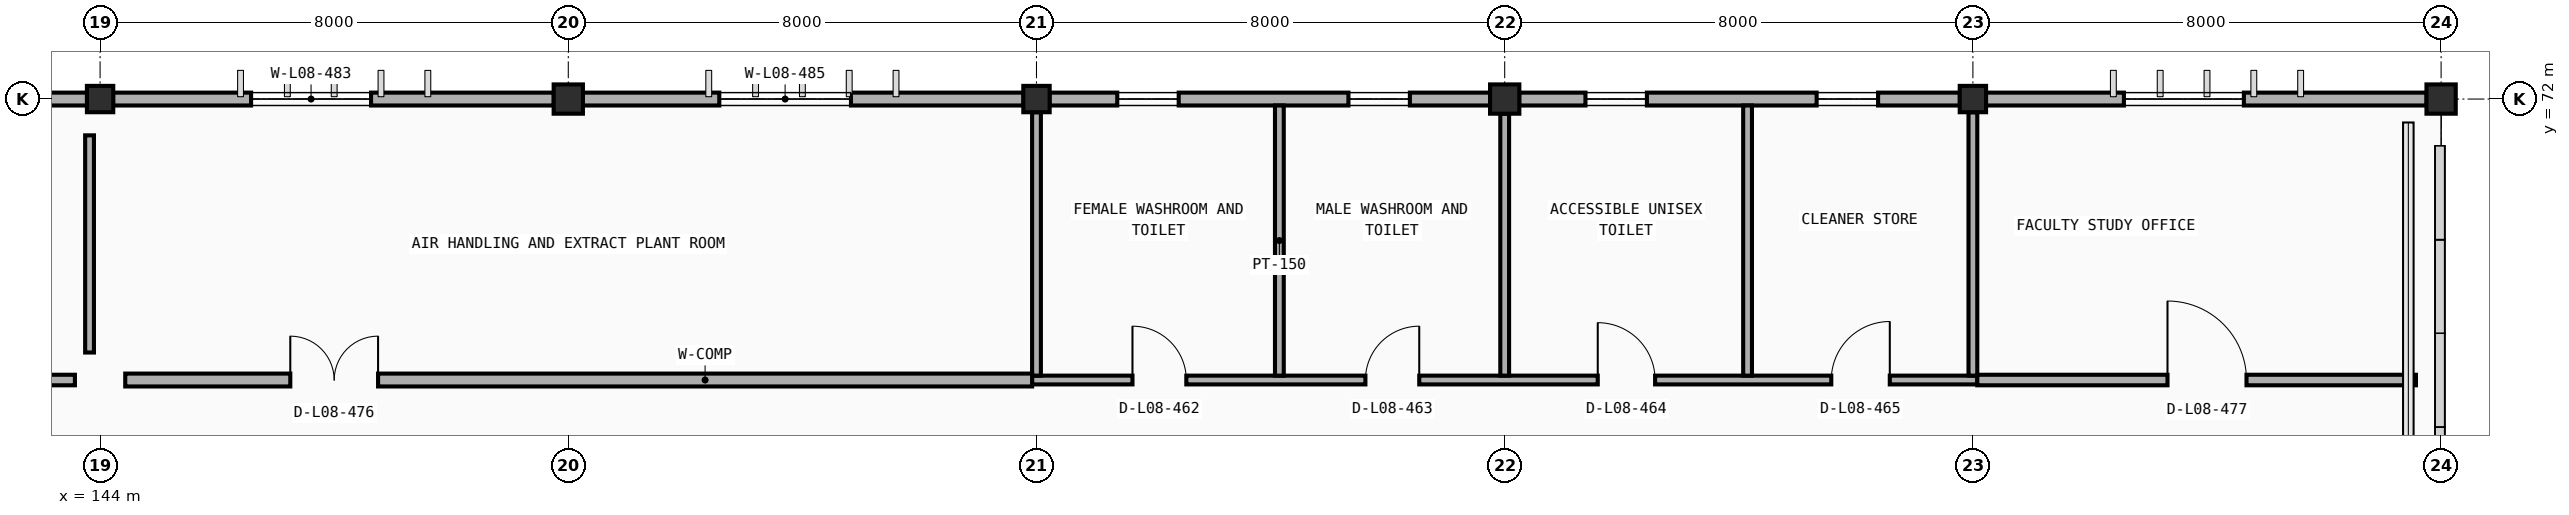
"""IFC4 building model, lengths in metres.
Left out: names, types, materials, properties, quantities, classifications, styles, units other than length and angle.
Written with IfcOpenShell. Run it as: python <this file> out.ifc"""

import sys

from ifc_helpers import new_model, si_unit, direction, frame, frame_2d, origin, origin_2d, place, context, subcontext, project, spatial, rectangle, extrude, element, fill, save


model = new_model("IFC4")
c1 = context("Model", 3, precision=1e-05, world=origin(), true_north=direction((0.0, 1.0)))
c2 = subcontext(c1, "Body", "Model", "MODEL_VIEW")
j1 = project(units=[si_unit("LENGTHUNIT", "METRE"), si_unit("PLANEANGLEUNIT", "RADIAN")], contexts=[c1])
p1 = place(None, origin())
s1 = spatial("IfcSite", under=j1, at=p1, CompositionType="ELEMENT")
p2 = place(p1, origin())
s2 = spatial("IfcBuilding", under=s1, at=p2, CompositionType="ELEMENT")
p3 = place(p2, frame((0.0, 0.0, 30.6)))
s3 = spatial("IfcBuildingStorey", under=s2, at=p3, CompositionType="ELEMENT", Elevation=30.6)
p4 = place(p3, frame((144.0, 72.0, 0.0), z_axis=(0.0, 0.0, 1.0), x_axis=(1.0, 0.0, 0.0)))
e1 = element("IfcColumn", 1, at=p4, inside=s3, PredefinedType="COLUMN", context=c2, shape_type="SweptSolid", body=[
    extrude(rectangle(XDim=0.45, YDim=0.45, at=origin_2d()), origin(), (0.0, 0.0, 1.0), 4.2),
])
p5 = place(p3, frame((152.0, 72.0, 0.0), z_axis=(0.0, 0.0, 1.0), x_axis=(1.0, 0.0, 0.0)))
e2 = element("IfcColumn", 2, at=p5, inside=s3, PredefinedType="COLUMN", context=c2, shape_type="SweptSolid", body=[
    extrude(rectangle(XDim=0.5, YDim=0.5, at=origin_2d()), origin(), (0.0, 0.0, 1.0), 4.2),
])
p6 = place(p3, frame((160.0, 72.0, 0.0), z_axis=(0.0, 0.0, 1.0), x_axis=(1.0, 0.0, 0.0)))
e3 = element("IfcColumn", 3, at=p6, inside=s3, PredefinedType="COLUMN", context=c2, shape_type="SweptSolid", body=[
    extrude(rectangle(XDim=0.45, YDim=0.45, at=origin_2d()), origin(), (0.0, 0.0, 1.0), 4.2),
])
p7 = place(p3, frame((168.0, 72.0, 0.0), z_axis=(0.0, 0.0, 1.0), x_axis=(1.0, 0.0, 0.0)))
e4 = element("IfcColumn", 4, at=p7, inside=s3, PredefinedType="COLUMN", context=c2, shape_type="SweptSolid", body=[
    extrude(rectangle(XDim=0.5, YDim=0.5, at=origin_2d()), origin(), (0.0, 0.0, 1.0), 4.2),
])
p8 = place(p3, frame((176.0, 72.0, 0.0), z_axis=(0.0, 0.0, 1.0), x_axis=(1.0, 0.0, 0.0)))
e5 = element("IfcColumn", 5, at=p8, inside=s3, PredefinedType="COLUMN", context=c2, shape_type="SweptSolid", body=[
    extrude(rectangle(XDim=0.45, YDim=0.45, at=origin_2d()), origin(), (0.0, 0.0, 1.0), 4.2),
])
p9 = place(p3, frame((184.0, 72.0, 0.0), z_axis=(0.0, 0.0, 1.0), x_axis=(1.0, 0.0, 0.0)))
e6 = element("IfcColumn", 6, at=p9, inside=s3, PredefinedType="COLUMN", context=c2, shape_type="SweptSolid", body=[
    extrude(rectangle(XDim=0.5, YDim=0.5, at=origin_2d()), origin(), (0.0, 0.0, 1.0), 4.2),
])
p10 = place(p3, frame((136.247, 72.0, 0.0), z_axis=(0.0, 0.0, 1.0), x_axis=(1.0, 0.0, 0.0)))
e7 = element("IfcWall", 7, at=p10, inside=s3, PredefinedType="STANDARD", context=c2, shape_type="SweptSolid", body=[
    extrude(rectangle(XDim=7.531, YDim=0.22, at=frame_2d((3.766, 0.0))), origin(), (0.0, 0.0, 1.0), 3.335),
])
p11 = place(p10, frame((2.333, 0.0, 0.9)))
e8 = element("IfcOpeningElement", 8, at=p11, cuts=e7, PredefinedType="OPENING", context=c2, shape_type="SweptSolid", body=[
    extrude(rectangle(XDim=1.85, YDim=1.25, at=frame_2d((0.925, 0.625))), frame((0.0, 0.12, 0.0), z_axis=(0.0, -1.0, 0.0), x_axis=(1.0, 0.0, 0.0)), (0.0, 0.0, 1.0), 0.24),
])
p12 = place(p3, frame((144.222, 72.0, 0.0), z_axis=(0.0, 0.0, 1.0), x_axis=(1.0, 0.0, 0.0)))
e9 = element("IfcWall", 9, at=p12, inside=s3, PredefinedType="STANDARD", context=c2, shape_type="SweptSolid", body=[
    extrude(rectangle(XDim=7.531, YDim=0.22, at=frame_2d((3.766, 0.0))), origin(), (0.0, 0.0, 1.0), 3.335),
])
p13 = place(p12, frame((2.358, 0.0, 0.9)))
e10 = element("IfcOpeningElement", 10, at=p13, cuts=e9, PredefinedType="OPENING", context=c2, shape_type="SweptSolid", body=[
    extrude(rectangle(XDim=2.05, YDim=1.25, at=frame_2d((1.025, 0.625))), frame((0.0, 0.12, 0.0), z_axis=(0.0, -1.0, 0.0), x_axis=(1.0, 0.0, 0.0)), (0.0, 0.0, 1.0), 0.24),
])
p14 = place(p3, frame((152.247, 72.0, 0.0), z_axis=(0.0, 0.0, 1.0), x_axis=(1.0, 0.0, 0.0)))
e11 = element("IfcWall", 11, at=p14, inside=s3, PredefinedType="STANDARD", context=c2, shape_type="SweptSolid", body=[
    extrude(rectangle(XDim=7.531, YDim=0.22, at=frame_2d((3.766, 0.0))), origin(), (0.0, 0.0, 1.0), 3.335),
])
p15 = place(p14, frame((2.333, 0.0, 0.9)))
e12 = element("IfcOpeningElement", 12, at=p15, cuts=e11, PredefinedType="OPENING", context=c2, shape_type="SweptSolid", body=[
    extrude(rectangle(XDim=2.25, YDim=1.25, at=frame_2d((1.125, 0.625))), frame((0.0, 0.12, 0.0), z_axis=(0.0, -1.0, 0.0), x_axis=(1.0, 0.0, 0.0)), (0.0, 0.0, 1.0), 0.24),
])
p16 = place(p3, frame((160.222, 72.0, 0.0), z_axis=(0.0, 0.0, 1.0), x_axis=(1.0, 0.0, 0.0)))
e13 = element("IfcWall", 13, at=p16, inside=s3, PredefinedType="STANDARD", context=c2, shape_type="SweptSolid", body=[
    extrude(rectangle(XDim=7.531, YDim=0.22, at=frame_2d((3.766, 0.0))), origin(), (0.0, 0.0, 1.0), 3.335),
])
p17 = place(p16, frame((1.158, 0.0, 1.15)))
e14 = element("IfcOpeningElement", 14, at=p17, cuts=e13, PredefinedType="OPENING", context=c2, shape_type="SweptSolid", body=[
    extrude(rectangle(XDim=1.05, YDim=1.25, at=frame_2d((0.525, 0.625))), frame((0.0, 0.12, 0.0), z_axis=(0.0, -1.0, 0.0), x_axis=(1.0, 0.0, 0.0)), (0.0, 0.0, 1.0), 0.24),
])
p18 = place(p16, frame((5.108, 0.0, 1.15)))
e15 = element("IfcOpeningElement", 15, at=p18, cuts=e13, PredefinedType="OPENING", context=c2, shape_type="SweptSolid", body=[
    extrude(rectangle(XDim=1.05, YDim=1.25, at=frame_2d((0.525, 0.625))), frame((0.0, 0.12, 0.0), z_axis=(0.0, -1.0, 0.0), x_axis=(1.0, 0.0, 0.0)), (0.0, 0.0, 1.0), 0.24),
])
p19 = place(p3, frame((168.247, 72.0, 0.0), z_axis=(0.0, 0.0, 1.0), x_axis=(1.0, 0.0, 0.0)))
e16 = element("IfcWall", 16, at=p19, inside=s3, PredefinedType="STANDARD", context=c2, shape_type="SweptSolid", body=[
    extrude(rectangle(XDim=7.531, YDim=0.22, at=frame_2d((3.766, 0.0))), origin(), (0.0, 0.0, 1.0), 3.335),
])
p20 = place(p19, frame((1.133, 0.0, 1.15)))
e17 = element("IfcOpeningElement", 17, at=p20, cuts=e16, PredefinedType="OPENING", context=c2, shape_type="SweptSolid", body=[
    extrude(rectangle(XDim=1.05, YDim=1.25, at=frame_2d((0.525, 0.625))), frame((0.0, 0.12, 0.0), z_axis=(0.0, -1.0, 0.0), x_axis=(1.0, 0.0, 0.0)), (0.0, 0.0, 1.0), 0.24),
])
p21 = place(p19, frame((5.083, 0.0, 1.15)))
e18 = element("IfcOpeningElement", 18, at=p21, cuts=e16, PredefinedType="OPENING", context=c2, shape_type="SweptSolid", body=[
    extrude(rectangle(XDim=1.05, YDim=1.25, at=frame_2d((0.525, 0.625))), frame((0.0, 0.12, 0.0), z_axis=(0.0, -1.0, 0.0), x_axis=(1.0, 0.0, 0.0)), (0.0, 0.0, 1.0), 0.24),
])
p22 = place(p3, frame((176.222, 72.0, 0.0), z_axis=(0.0, 0.0, 1.0), x_axis=(1.0, 0.0, 0.0)))
e19 = element("IfcWall", 19, at=p22, inside=s3, PredefinedType="STANDARD", context=c2, shape_type="SweptSolid", body=[
    extrude(rectangle(XDim=7.531, YDim=0.22, at=frame_2d((3.766, 0.0))), origin(), (0.0, 0.0, 1.0), 3.335),
])
p23 = place(p22, frame((2.358, 0.0, 0.9)))
e20 = element("IfcOpeningElement", 20, at=p23, cuts=e19, PredefinedType="OPENING", context=c2, shape_type="SweptSolid", body=[
    extrude(rectangle(XDim=2.05, YDim=1.25, at=frame_2d((1.025, 0.625))), frame((0.0, 0.12, 0.0), z_axis=(0.0, -1.0, 0.0), x_axis=(1.0, 0.0, 0.0)), (0.0, 0.0, 1.0), 0.24),
])
p24 = place(p3, frame((183.76, 71.78, 0.0), z_axis=(0.0, 0.0, 1.0), x_axis=(-1.0, 0.0, 0.0)))
e21 = element("IfcWall", 21, at=p24, inside=s3, PredefinedType="PARAPET", context=c2, shape_type="SweptSolid", body=[
    extrude(rectangle(XDim=0.32, YDim=0.2, at=frame_2d((0.16, 0.0))), origin(), (0.0, 0.0, 1.0), 3.35),
])
p25 = place(p3, frame((159.925, 67.2, 0.0), z_axis=(0.0, 0.0, 1.0), x_axis=(1.0, 0.0, 0.0)))
e22 = element("IfcWall", 22, at=p25, inside=s3, PredefinedType="PARTITIONING", context=c2, shape_type="SweptSolid", body=[
    extrude(rectangle(XDim=16.15, YDim=0.15, at=frame_2d((8.075, 0.0))), origin(), (0.0, 0.0, 1.0), 3.3),
])
p26 = place(p25, frame((1.715, 0.0, 0.0)))
e23 = element("IfcOpeningElement", 23, at=p26, cuts=e22, PredefinedType="OPENING", context=c2, shape_type="SweptSolid", body=[
    extrude(rectangle(XDim=0.92, YDim=2.12, at=frame_2d((0.46, 1.06))), frame((0.0, 0.085, 0.0), z_axis=(0.0, -1.0, 0.0), x_axis=(1.0, 0.0, 0.0)), (0.0, 0.0, 1.0), 0.17),
])
p27 = place(p25, frame((5.695, 0.0, 0.0)))
e24 = element("IfcOpeningElement", 24, at=p27, cuts=e22, PredefinedType="OPENING", context=c2, shape_type="SweptSolid", body=[
    extrude(rectangle(XDim=0.92, YDim=2.12, at=frame_2d((0.46, 1.06))), frame((0.0, 0.085, 0.0), z_axis=(0.0, -1.0, 0.0), x_axis=(1.0, 0.0, 0.0)), (0.0, 0.0, 1.0), 0.17),
])
p28 = place(p25, frame((9.665, 0.0, 0.0)))
e25 = element("IfcOpeningElement", 25, at=p28, cuts=e22, PredefinedType="OPENING", context=c2, shape_type="SweptSolid", body=[
    extrude(rectangle(XDim=0.98, YDim=2.12, at=frame_2d((0.49, 1.06))), frame((0.0, 0.085, 0.0), z_axis=(0.0, -1.0, 0.0), x_axis=(1.0, 0.0, 0.0)), (0.0, 0.0, 1.0), 0.17),
])
p29 = place(p25, frame((13.655, 0.0, 0.0)))
e26 = element("IfcOpeningElement", 26, at=p29, cuts=e22, PredefinedType="OPENING", context=c2, shape_type="SweptSolid", body=[
    extrude(rectangle(XDim=1.0, YDim=2.15, at=frame_2d((0.5, 1.075))), frame((0.0, 0.085, 0.0), z_axis=(0.0, -1.0, 0.0), x_axis=(1.0, 0.0, 0.0)), (0.0, 0.0, 1.0), 0.17),
])
p30 = place(p3, frame((160.0, 67.275, 0.0), z_axis=(0.0, 0.0, 1.0), x_axis=(0.0, 1.0, 0.0)))
e27 = element("IfcWall", 27, at=p30, inside=s3, PredefinedType="PARTITIONING", context=c2, shape_type="SweptSolid", body=[
    extrude(rectangle(XDim=4.5, YDim=0.15, at=frame_2d((2.25, 0.0))), origin(), (0.0, 0.0, 1.0), 3.3),
])
p31 = place(p3, frame((164.15, 67.275, 0.0), z_axis=(0.0, 0.0, 1.0), x_axis=(0.0, 1.0, 0.0)))
e28 = element("IfcWall", 28, at=p31, inside=s3, PredefinedType="PARTITIONING", context=c2, shape_type="SweptSolid", body=[
    extrude(rectangle(XDim=4.615, YDim=0.15, at=frame_2d((2.308, 0.0))), origin(), (0.0, 0.0, 1.0), 3.3),
])
p32 = place(p3, frame((168.0, 67.275, 0.0), z_axis=(0.0, 0.0, 1.0), x_axis=(0.0, 1.0, 0.0)))
e29 = element("IfcWall", 29, at=p32, inside=s3, PredefinedType="PARTITIONING", context=c2, shape_type="SweptSolid", body=[
    extrude(rectangle(XDim=4.475, YDim=0.15, at=frame_2d((2.238, 0.0))), origin(), (0.0, 0.0, 1.0), 3.3),
])
p33 = place(p3, frame((172.15, 67.275, 0.0), z_axis=(0.0, 0.0, 1.0), x_axis=(0.0, 1.0, 0.0)))
e30 = element("IfcWall", 30, at=p33, inside=s3, PredefinedType="PARTITIONING", context=c2, shape_type="SweptSolid", body=[
    extrude(rectangle(XDim=4.615, YDim=0.15, at=frame_2d((2.308, 0.0))), origin(), (0.0, 0.0, 1.0), 3.3),
])
p34 = place(p3, frame((176.0, 67.275, 0.0), z_axis=(0.0, 0.0, 1.0), x_axis=(0.0, 1.0, 0.0)))
e31 = element("IfcWall", 31, at=p34, inside=s3, PredefinedType="PARTITIONING", context=c2, shape_type="SweptSolid", body=[
    extrude(rectangle(XDim=4.5, YDim=0.15, at=frame_2d((2.25, 0.0))), origin(), (0.0, 0.0, 1.0), 3.3),
])
p35 = place(p3, frame((128.43, 67.2, 0.0), z_axis=(0.0, 0.0, 1.0), x_axis=(1.0, 0.0, 0.0)))
e32 = element("IfcWall", 32, at=p35, inside=s3, PredefinedType="PARTITIONING", context=c2, shape_type="SweptSolid", body=[
    extrude(rectangle(XDim=15.14, YDim=0.18, at=frame_2d((7.57, 0.0))), origin(), (0.0, 0.0, 1.0), 3.3),
])
p36 = place(p35, frame((2.995, 0.0, 0.0)))
e33 = element("IfcOpeningElement", 33, at=p36, cuts=e32, PredefinedType="OPENING", context=c2, shape_type="SweptSolid", body=[
    extrude(rectangle(XDim=1.15, YDim=2.15, at=frame_2d((0.575, 1.075))), frame((0.0, 0.1, 0.0), z_axis=(0.0, -1.0, 0.0), x_axis=(1.0, 0.0, 0.0)), (0.0, 0.0, 1.0), 0.2),
])
p37 = place(p3, frame((143.82, 67.67, 0.0), z_axis=(0.0, 0.0, 1.0), x_axis=(0.0, 1.0, 0.0)))
e34 = element("IfcWall", 34, at=p37, inside=s3, PredefinedType="PARTITIONING", context=c2, shape_type="SweptSolid", body=[
    extrude(rectangle(XDim=3.71, YDim=0.15, at=frame_2d((1.855, 0.0))), origin(), (0.0, 0.0, 1.0), 3.3),
])
p38 = place(p3, frame((144.43, 67.2, 0.0), z_axis=(0.0, 0.0, 1.0), x_axis=(1.0, 0.0, 0.0)))
e35 = element("IfcWall", 35, at=p38, inside=s3, PredefinedType="PARTITIONING", context=c2, shape_type="SweptSolid", body=[
    extrude(rectangle(XDim=15.495, YDim=0.22, at=frame_2d((7.748, 0.0))), origin(), (0.0, 0.0, 1.0), 3.3),
])
p39 = place(p38, frame((2.82, 0.0, 0.0)))
e36 = element("IfcOpeningElement", 36, at=p39, cuts=e35, PredefinedType="OPENING", context=c2, shape_type="SweptSolid", body=[
    extrude(rectangle(XDim=1.5, YDim=2.2, at=frame_2d((0.75, 1.1))), frame((0.0, 0.12, 0.0), z_axis=(0.0, -1.0, 0.0), x_axis=(1.0, 0.0, 0.0)), (0.0, 0.0, 1.0), 0.24),
])
p40 = place(p3, frame((176.075, 67.2, 0.0), z_axis=(0.0, 0.0, 1.0), x_axis=(1.0, 0.0, 0.0)))
e37 = element("IfcWall", 37, at=p40, inside=s3, PredefinedType="PARTITIONING", context=c2, shape_type="SweptSolid", body=[
    extrude(rectangle(XDim=7.495, YDim=0.18, at=frame_2d((3.748, 0.0))), origin(), (0.0, 0.0, 1.0), 3.3),
])
p41 = place(p40, frame((3.25, 0.0, 0.0)))
e38 = element("IfcOpeningElement", 38, at=p41, cuts=e37, PredefinedType="OPENING", context=c2, shape_type="SweptSolid", body=[
    extrude(rectangle(XDim=1.35, YDim=2.2, at=frame_2d((0.675, 1.1))), frame((0.0, 0.1, 0.0), z_axis=(0.0, -1.0, 0.0), x_axis=(1.0, 0.0, 0.0)), (0.0, 0.0, 1.0), 0.2),
])
p42 = place(p13, origin())
e39 = element("IfcWindow", 39, at=p42, inside=s3, PartitioningType="DOUBLE_PANEL_VERTICAL", PredefinedType="WINDOW", context=c2, shape_type="SweptSolid", body=[
    extrude(rectangle(XDim=2.05, YDim=1.25, at=frame_2d((1.025, 0.625))), frame((0.0, 0.03, 0.0), z_axis=(0.0, -1.0, 0.0), x_axis=(1.0, 0.0, 0.0)), (0.0, 0.0, 1.0), 0.06),
])
fill(e10, e39)
p43 = place(p15, origin())
e40 = element("IfcWindow", 40, at=p43, inside=s3, PartitioningType="DOUBLE_PANEL_VERTICAL", PredefinedType="WINDOW", context=c2, shape_type="SweptSolid", body=[
    extrude(rectangle(XDim=2.25, YDim=1.25, at=frame_2d((1.125, 0.625))), frame((0.0, 0.03, 0.0), z_axis=(0.0, -1.0, 0.0), x_axis=(1.0, 0.0, 0.0)), (0.0, 0.0, 1.0), 0.06),
])
fill(e12, e40)
p44 = place(p17, origin())
e41 = element("IfcWindow", 41, at=p44, inside=s3, PartitioningType="SINGLE_PANEL", PredefinedType="WINDOW", context=c2, shape_type="SweptSolid", body=[
    extrude(rectangle(XDim=1.05, YDim=1.25, at=frame_2d((0.525, 0.625))), frame((0.0, 0.03, 0.0), z_axis=(0.0, -1.0, 0.0), x_axis=(1.0, 0.0, 0.0)), (0.0, 0.0, 1.0), 0.06),
])
fill(e14, e41)
p45 = place(p18, origin())
e42 = element("IfcWindow", 42, at=p45, inside=s3, PartitioningType="SINGLE_PANEL", PredefinedType="WINDOW", context=c2, shape_type="SweptSolid", body=[
    extrude(rectangle(XDim=1.05, YDim=1.25, at=frame_2d((0.525, 0.625))), frame((0.0, 0.03, 0.0), z_axis=(0.0, -1.0, 0.0), x_axis=(1.0, 0.0, 0.0)), (0.0, 0.0, 1.0), 0.06),
])
fill(e15, e42)
p46 = place(p20, origin())
e43 = element("IfcWindow", 43, at=p46, inside=s3, PartitioningType="SINGLE_PANEL", PredefinedType="WINDOW", context=c2, shape_type="SweptSolid", body=[
    extrude(rectangle(XDim=1.05, YDim=1.25, at=frame_2d((0.525, 0.625))), frame((0.0, 0.03, 0.0), z_axis=(0.0, -1.0, 0.0), x_axis=(1.0, 0.0, 0.0)), (0.0, 0.0, 1.0), 0.06),
])
fill(e17, e43)
p47 = place(p21, origin())
e44 = element("IfcWindow", 44, at=p47, inside=s3, PartitioningType="SINGLE_PANEL", PredefinedType="WINDOW", context=c2, shape_type="SweptSolid", body=[
    extrude(rectangle(XDim=1.05, YDim=1.25, at=frame_2d((0.525, 0.625))), frame((0.0, 0.03, 0.0), z_axis=(0.0, -1.0, 0.0), x_axis=(1.0, 0.0, 0.0)), (0.0, 0.0, 1.0), 0.06),
])
fill(e18, e44)
p48 = place(p23, origin())
e45 = element("IfcWindow", 45, at=p48, inside=s3, PartitioningType="DOUBLE_PANEL_VERTICAL", PredefinedType="WINDOW", context=c2, shape_type="SweptSolid", body=[
    extrude(rectangle(XDim=2.05, YDim=1.25, at=frame_2d((1.025, 0.625))), frame((0.0, 0.03, 0.0), z_axis=(0.0, -1.0, 0.0), x_axis=(1.0, 0.0, 0.0)), (0.0, 0.0, 1.0), 0.06),
])
fill(e20, e45)
p49 = place(p26, origin())
e46 = element("IfcDoor", 46, at=p49, inside=s3, OperationType="SINGLE_SWING_LEFT", PredefinedType="DOOR", context=c2, shape_type="SweptSolid", body=[
    extrude(rectangle(XDim=0.92, YDim=2.12, at=frame_2d((0.46, 1.06))), frame((0.0, 0.025, 0.0), z_axis=(0.0, -1.0, 0.0), x_axis=(1.0, 0.0, 0.0)), (0.0, 0.0, 1.0), 0.05),
])
fill(e23, e46)
p50 = place(p27, origin())
e47 = element("IfcDoor", 47, at=p50, inside=s3, OperationType="SINGLE_SWING_RIGHT", PredefinedType="DOOR", context=c2, shape_type="SweptSolid", body=[
    extrude(rectangle(XDim=0.92, YDim=2.12, at=frame_2d((0.46, 1.06))), frame((0.0, 0.025, 0.0), z_axis=(0.0, -1.0, 0.0), x_axis=(1.0, 0.0, 0.0)), (0.0, 0.0, 1.0), 0.05),
])
fill(e24, e47)
p51 = place(p28, origin())
e48 = element("IfcDoor", 48, at=p51, inside=s3, OperationType="SINGLE_SWING_LEFT", PredefinedType="DOOR", context=c2, shape_type="SweptSolid", body=[
    extrude(rectangle(XDim=0.98, YDim=2.12, at=frame_2d((0.49, 1.06))), frame((0.0, 0.025, 0.0), z_axis=(0.0, -1.0, 0.0), x_axis=(1.0, 0.0, 0.0)), (0.0, 0.0, 1.0), 0.05),
])
fill(e25, e48)
p52 = place(p29, origin())
e49 = element("IfcDoor", 49, at=p52, inside=s3, OperationType="SINGLE_SWING_RIGHT", PredefinedType="DOOR", context=c2, shape_type="SweptSolid", body=[
    extrude(rectangle(XDim=1.0, YDim=2.15, at=frame_2d((0.5, 1.075))), frame((0.0, 0.025, 0.0), z_axis=(0.0, -1.0, 0.0), x_axis=(1.0, 0.0, 0.0)), (0.0, 0.0, 1.0), 0.05),
])
fill(e26, e49)
p53 = place(p39, origin())
e50 = element("IfcDoor", 50, at=p53, inside=s3, OperationType="DOUBLE_DOOR_SINGLE_SWING", PredefinedType="DOOR", context=c2, shape_type="SweptSolid", body=[
    extrude(rectangle(XDim=1.5, YDim=2.2, at=frame_2d((0.75, 1.1))), frame((0.0, 0.025, 0.0), z_axis=(0.0, -1.0, 0.0), x_axis=(1.0, 0.0, 0.0)), (0.0, 0.0, 1.0), 0.05),
])
fill(e36, e50)
p54 = place(p41, origin())
e51 = element("IfcDoor", 51, at=p54, inside=s3, OperationType="SINGLE_SWING_LEFT", PredefinedType="DOOR", context=c2, shape_type="SweptSolid", body=[
    extrude(rectangle(XDim=1.35, YDim=2.2, at=frame_2d((0.675, 1.1))), frame((0.0, 0.025, 0.0), z_axis=(0.0, -1.0, 0.0), x_axis=(1.0, 0.0, 0.0)), (0.0, 0.0, 1.0), 0.05),
])
fill(e38, e51)
save(model, sys.argv[1])
